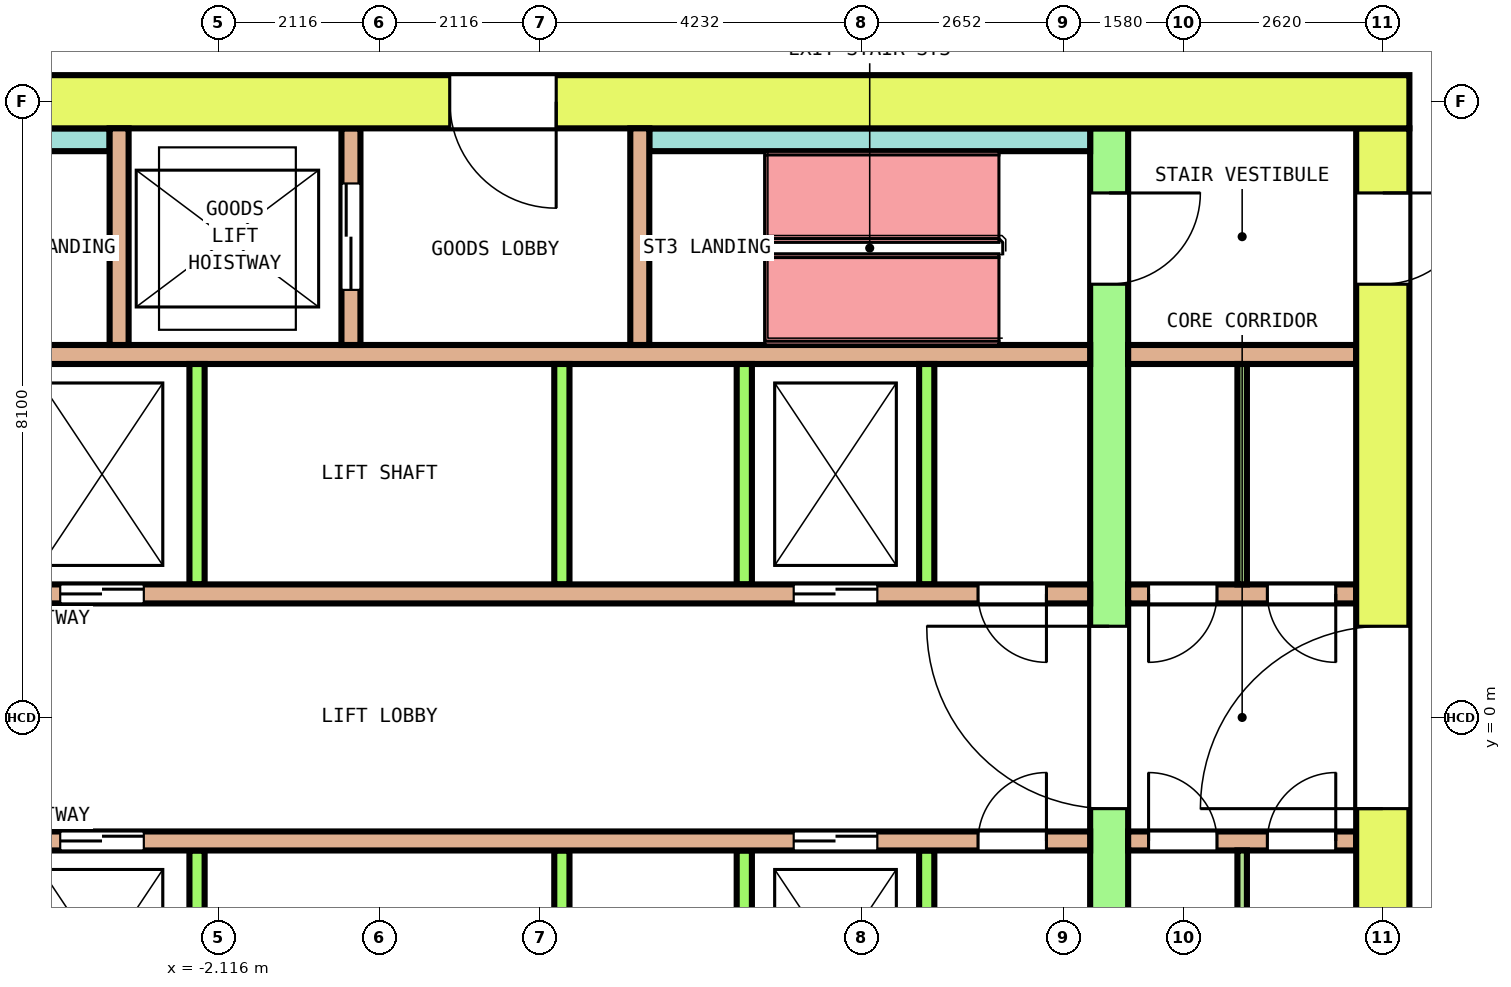
"""IFC4 building model, lengths in metres.
Left out: names, types, materials, properties, quantities, classifications, styles, units other than length and angle.
Written with IfcOpenShell. Run it as: python <this file> out.ifc"""

import sys

from ifc_helpers import new_model, si_unit, direction, frame, frame_2d, origin, place, context, subcontext, project, spatial, rectangle, extrude, element, fill, save


model = new_model("IFC4")
c1 = context("Model", 3, precision=1e-05, world=origin(), true_north=direction((0.0, 1.0)))
c2 = subcontext(c1, "Body", "Model", "MODEL_VIEW")
j1 = project(units=[si_unit("LENGTHUNIT", "METRE"), si_unit("PLANEANGLEUNIT", "RADIAN")], contexts=[c1])
p1 = place(None, origin())
s1 = spatial("IfcSite", under=j1, at=p1, CompositionType="ELEMENT")
p2 = place(p1, origin())
s2 = spatial("IfcBuilding", under=s1, at=p2, CompositionType="ELEMENT")
p3 = place(p2, frame((0.0, 0.0, 198.0)))
s3 = spatial("IfcBuildingStorey", under=s2, at=p3, CompositionType="ELEMENT", Elevation=198.0)
p4 = place(p3, frame((-13.55, 8.1, 0.0), z_axis=(0.0, 0.0, 1.0), x_axis=(1.0, 0.0, 0.0)))
e1 = element("IfcWall", 1, at=p4, inside=s3, PredefinedType="SHEAR", context=c2, shape_type="SweptSolid", body=[
    extrude(rectangle(XDim=27.1, YDim=0.7, at=frame_2d((13.55, 0.0))), origin(), (0.0, 0.0, 1.0), 4.1),
])
p5 = place(p4, frame((14.475, 0.0, 0.0)))
e2 = element("IfcOpeningElement", 2, at=p5, cuts=e1, PredefinedType="OPENING", context=c2, shape_type="SweptSolid", body=[
    extrude(rectangle(XDim=1.4, YDim=2.1, at=frame_2d((0.7, 1.05))), frame((0.0, 0.36, 0.0), z_axis=(0.0, -1.0, 0.0), x_axis=(1.0, 0.0, 0.0)), (0.0, 0.0, 1.0), 0.72),
])
p6 = place(p3, frame((13.2, -7.75, 0.0), z_axis=(0.0, 0.0, 1.0), x_axis=(0.0, 1.0, 0.0)))
e3 = element("IfcWall", 3, at=p6, inside=s3, PredefinedType="SHEAR", context=c2, shape_type="SweptSolid", body=[
    extrude(rectangle(XDim=15.5, YDim=0.7, at=frame_2d((7.75, 0.0))), origin(), (0.0, 0.0, 1.0), 4.1),
])
p7 = place(p6, frame((6.55, 0.0, 0.0)))
e4 = element("IfcOpeningElement", 4, at=p7, cuts=e3, PredefinedType="OPENING", context=c2, shape_type="SweptSolid", body=[
    extrude(rectangle(XDim=2.4, YDim=2.1, at=frame_2d((1.2, 1.05))), frame((0.0, 0.36, 0.0), z_axis=(0.0, -1.0, 0.0), x_axis=(1.0, 0.0, 0.0)), (0.0, 0.0, 1.0), 0.72),
])
p8 = place(p6, frame((13.45, 0.0, 0.0)))
e5 = element("IfcOpeningElement", 5, at=p8, cuts=e3, PredefinedType="OPENING", context=c2, shape_type="SweptSolid", body=[
    extrude(rectangle(XDim=1.2, YDim=2.1, at=frame_2d((0.6, 1.05))), frame((0.0, 0.36, 0.0), z_axis=(0.0, -1.0, 0.0), x_axis=(1.0, 0.0, 0.0)), (0.0, 0.0, 1.0), 0.72),
])
p9 = place(p6, frame((0.95, 0.0, 0.0)))
e6 = element("IfcOpeningElement", 6, at=p9, cuts=e3, PredefinedType="OPENING", context=c2, shape_type="SweptSolid", body=[
    extrude(rectangle(XDim=1.0, YDim=2.1, at=frame_2d((0.5, 1.05))), frame((0.0, 0.36, 0.0), z_axis=(0.0, -1.0, 0.0), x_axis=(1.0, 0.0, 0.0)), (0.0, 0.0, 1.0), 0.72),
])
p10 = place(p3, frame((9.6, -7.75, 0.0), z_axis=(0.0, 0.0, 1.0), x_axis=(0.0, 1.0, 0.0)))
e7 = element("IfcWall", 7, at=p10, inside=s3, PredefinedType="SHEAR", context=c2, shape_type="SweptSolid", body=[
    extrude(rectangle(XDim=15.5, YDim=0.5, at=frame_2d((7.75, 0.0))), origin(), (0.0, 0.0, 1.0), 4.1),
])
p11 = place(p10, frame((6.55, 0.0, 0.0)))
e8 = element("IfcOpeningElement", 8, at=p11, cuts=e7, PredefinedType="OPENING", context=c2, shape_type="SweptSolid", body=[
    extrude(rectangle(XDim=2.4, YDim=2.1, at=frame_2d((1.2, 1.05))), frame((0.0, 0.26, 0.0), z_axis=(0.0, -1.0, 0.0), x_axis=(1.0, 0.0, 0.0)), (0.0, 0.0, 1.0), 0.52),
])
p12 = place(p10, frame((13.45, 0.0, 0.0)))
e9 = element("IfcOpeningElement", 9, at=p12, cuts=e7, PredefinedType="OPENING", context=c2, shape_type="SweptSolid", body=[
    extrude(rectangle(XDim=1.2, YDim=2.1, at=frame_2d((0.6, 1.05))), frame((0.0, 0.26, 0.0), z_axis=(0.0, -1.0, 0.0), x_axis=(1.0, 0.0, 0.0)), (0.0, 0.0, 1.0), 0.52),
])
p13 = place(p10, frame((0.95, 0.0, 0.0)))
e10 = element("IfcOpeningElement", 10, at=p13, cuts=e7, PredefinedType="OPENING", context=c2, shape_type="SweptSolid", body=[
    extrude(rectangle(XDim=1.0, YDim=2.1, at=frame_2d((0.5, 1.05))), frame((0.0, 0.26, 0.0), z_axis=(0.0, -1.0, 0.0), x_axis=(1.0, 0.0, 0.0)), (0.0, 0.0, 1.0), 0.52),
])
p14 = place(p3, frame((-9.35, 1.625, 0.0), z_axis=(0.0, 0.0, 1.0), x_axis=(1.0, 0.0, 0.0)))
e11 = element("IfcWall", 11, at=p14, inside=s3, PredefinedType="SOLIDWALL", context=c2, shape_type="SweptSolid", body=[
    extrude(rectangle(XDim=18.7, YDim=0.25, at=frame_2d((9.35, 0.0))), origin(), (0.0, 0.0, 1.0), 4.1),
])
p15 = place(p14, frame((2.85, 0.0, 0.0)))
e12 = element("IfcOpeningElement", 12, at=p15, cuts=e11, PredefinedType="OPENING", context=c2, shape_type="SweptSolid", body=[
    extrude(rectangle(XDim=1.1, YDim=2.1, at=frame_2d((0.55, 1.05))), frame((0.0, 0.135, 0.0), z_axis=(0.0, -1.0, 0.0), x_axis=(1.0, 0.0, 0.0)), (0.0, 0.0, 1.0), 0.27),
])
p16 = place(p14, frame((5.15, 0.0, 0.0)))
e13 = element("IfcOpeningElement", 13, at=p16, cuts=e11, PredefinedType="OPENING", context=c2, shape_type="SweptSolid", body=[
    extrude(rectangle(XDim=1.1, YDim=2.1, at=frame_2d((0.55, 1.05))), frame((0.0, 0.135, 0.0), z_axis=(0.0, -1.0, 0.0), x_axis=(1.0, 0.0, 0.0)), (0.0, 0.0, 1.0), 0.27),
])
p17 = place(p14, frame((14.8, 0.0, 0.0)))
e14 = element("IfcOpeningElement", 14, at=p17, cuts=e11, PredefinedType="OPENING", context=c2, shape_type="SweptSolid", body=[
    extrude(rectangle(XDim=1.1, YDim=2.1, at=frame_2d((0.55, 1.05))), frame((0.0, 0.135, 0.0), z_axis=(0.0, -1.0, 0.0), x_axis=(1.0, 0.0, 0.0)), (0.0, 0.0, 1.0), 0.27),
])
p18 = place(p14, frame((0.575, 0.0, 0.0)))
e15 = element("IfcOpeningElement", 15, at=p18, cuts=e11, PredefinedType="OPENING", context=c2, shape_type="SweptSolid", body=[
    extrude(rectangle(XDim=0.9, YDim=2.1, at=frame_2d((0.45, 1.05))), frame((0.0, 0.135, 0.0), z_axis=(0.0, -1.0, 0.0), x_axis=(1.0, 0.0, 0.0)), (0.0, 0.0, 1.0), 0.27),
])
p19 = place(p14, frame((17.225, 0.0, 0.0)))
e16 = element("IfcOpeningElement", 16, at=p19, cuts=e11, PredefinedType="OPENING", context=c2, shape_type="SweptSolid", body=[
    extrude(rectangle(XDim=0.9, YDim=2.1, at=frame_2d((0.45, 1.05))), frame((0.0, 0.135, 0.0), z_axis=(0.0, -1.0, 0.0), x_axis=(1.0, 0.0, 0.0)), (0.0, 0.0, 1.0), 0.27),
])
p20 = place(p3, frame((9.85, 1.625, 0.0), z_axis=(0.0, 0.0, 1.0), x_axis=(1.0, 0.0, 0.0)))
e17 = element("IfcWall", 17, at=p20, inside=s3, PredefinedType="SOLIDWALL", context=c2, shape_type="SweptSolid", body=[
    extrude(rectangle(XDim=3.0, YDim=0.25, at=frame_2d((1.5, 0.0))), origin(), (0.0, 0.0, 1.0), 4.1),
])
p21 = place(p20, frame((0.269, 0.0, 0.0)))
e18 = element("IfcOpeningElement", 18, at=p21, cuts=e17, PredefinedType="OPENING", context=c2, shape_type="SweptSolid", body=[
    extrude(rectangle(XDim=0.9, YDim=2.1, at=frame_2d((0.45, 1.05))), frame((0.0, 0.135, 0.0), z_axis=(0.0, -1.0, 0.0), x_axis=(1.0, 0.0, 0.0)), (0.0, 0.0, 1.0), 0.27),
])
p22 = place(p20, frame((1.831, 0.0, 0.0)))
e19 = element("IfcOpeningElement", 19, at=p22, cuts=e17, PredefinedType="OPENING", context=c2, shape_type="SweptSolid", body=[
    extrude(rectangle(XDim=0.9, YDim=2.1, at=frame_2d((0.45, 1.05))), frame((0.0, 0.135, 0.0), z_axis=(0.0, -1.0, 0.0), x_axis=(1.0, 0.0, 0.0)), (0.0, 0.0, 1.0), 0.27),
])
p23 = place(p3, frame((-9.35, 4.775, 0.0), z_axis=(0.0, 0.0, 1.0), x_axis=(1.0, 0.0, 0.0)))
e20 = element("IfcWall", 20, at=p23, inside=s3, PredefinedType="SOLIDWALL", context=c2, shape_type="SweptSolid", body=[
    extrude(rectangle(XDim=18.7, YDim=0.25, at=frame_2d((9.35, 0.0))), origin(), (0.0, 0.0, 1.0), 4.1),
])
p24 = place(p3, frame((9.85, 4.775, 0.0), z_axis=(0.0, 0.0, 1.0), x_axis=(1.0, 0.0, 0.0)))
e21 = element("IfcWall", 21, at=p24, inside=s3, PredefinedType="SOLIDWALL", context=c2, shape_type="SweptSolid", body=[
    extrude(rectangle(XDim=3.0, YDim=0.25, at=frame_2d((1.5, 0.0))), origin(), (0.0, 0.0, 1.0), 4.1),
])
for number, where, z_axis, x_axis in (
    (22, (-2.4, 1.75, 0.0), (0.0, 0.0, 1.0), (0.0, 1.0, 0.0)),
    (23, (2.4, 1.75, 0.0), (0.0, 0.0, 1.0), (0.0, 1.0, 0.0)),
    (24, (4.8, 1.75, 0.0), (0.0, 0.0, 1.0), (0.0, 1.0, 0.0)),
    (25, (7.2, 1.75, 0.0), (0.0, 0.0, 1.0), (0.0, 1.0, 0.0)),
):
    element("IfcWall", number, at=place(p3, frame(where, z_axis=z_axis, x_axis=x_axis)), inside=s3, PredefinedType="SOLIDWALL", context=c2, shape_type="SweptSolid", body=[
        extrude(rectangle(XDim=2.9, YDim=0.2, at=frame_2d((1.45, 0.0))), origin(), (0.0, 0.0, 1.0), 4.1),
    ])
p25 = place(p3, frame((-9.35, -1.625, 0.0), z_axis=(0.0, 0.0, 1.0), x_axis=(1.0, 0.0, 0.0)))
e26 = element("IfcWall", 26, at=p25, inside=s3, PredefinedType="SOLIDWALL", context=c2, shape_type="SweptSolid", body=[
    extrude(rectangle(XDim=18.7, YDim=0.25, at=frame_2d((9.35, 0.0))), origin(), (0.0, 0.0, 1.0), 4.1),
])
p26 = place(p25, frame((2.85, 0.0, 0.0)))
e27 = element("IfcOpeningElement", 27, at=p26, cuts=e26, PredefinedType="OPENING", context=c2, shape_type="SweptSolid", body=[
    extrude(rectangle(XDim=1.1, YDim=2.1, at=frame_2d((0.55, 1.05))), frame((0.0, 0.135, 0.0), z_axis=(0.0, -1.0, 0.0), x_axis=(1.0, 0.0, 0.0)), (0.0, 0.0, 1.0), 0.27),
])
p27 = place(p25, frame((5.15, 0.0, 0.0)))
e28 = element("IfcOpeningElement", 28, at=p27, cuts=e26, PredefinedType="OPENING", context=c2, shape_type="SweptSolid", body=[
    extrude(rectangle(XDim=1.1, YDim=2.1, at=frame_2d((0.55, 1.05))), frame((0.0, 0.135, 0.0), z_axis=(0.0, -1.0, 0.0), x_axis=(1.0, 0.0, 0.0)), (0.0, 0.0, 1.0), 0.27),
])
p28 = place(p25, frame((14.8, 0.0, 0.0)))
e29 = element("IfcOpeningElement", 29, at=p28, cuts=e26, PredefinedType="OPENING", context=c2, shape_type="SweptSolid", body=[
    extrude(rectangle(XDim=1.1, YDim=2.1, at=frame_2d((0.55, 1.05))), frame((0.0, 0.135, 0.0), z_axis=(0.0, -1.0, 0.0), x_axis=(1.0, 0.0, 0.0)), (0.0, 0.0, 1.0), 0.27),
])
p29 = place(p25, frame((0.575, 0.0, 0.0)))
e30 = element("IfcOpeningElement", 30, at=p29, cuts=e26, PredefinedType="OPENING", context=c2, shape_type="SweptSolid", body=[
    extrude(rectangle(XDim=0.9, YDim=2.1, at=frame_2d((0.45, 1.05))), frame((0.0, 0.135, 0.0), z_axis=(0.0, -1.0, 0.0), x_axis=(1.0, 0.0, 0.0)), (0.0, 0.0, 1.0), 0.27),
])
p30 = place(p25, frame((17.225, 0.0, 0.0)))
e31 = element("IfcOpeningElement", 31, at=p30, cuts=e26, PredefinedType="OPENING", context=c2, shape_type="SweptSolid", body=[
    extrude(rectangle(XDim=0.9, YDim=2.1, at=frame_2d((0.45, 1.05))), frame((0.0, 0.135, 0.0), z_axis=(0.0, -1.0, 0.0), x_axis=(1.0, 0.0, 0.0)), (0.0, 0.0, 1.0), 0.27),
])
p31 = place(p3, frame((9.85, -1.625, 0.0), z_axis=(0.0, 0.0, 1.0), x_axis=(1.0, 0.0, 0.0)))
e32 = element("IfcWall", 32, at=p31, inside=s3, PredefinedType="SOLIDWALL", context=c2, shape_type="SweptSolid", body=[
    extrude(rectangle(XDim=3.0, YDim=0.25, at=frame_2d((1.5, 0.0))), origin(), (0.0, 0.0, 1.0), 4.1),
])
p32 = place(p31, frame((0.269, 0.0, 0.0)))
e33 = element("IfcOpeningElement", 33, at=p32, cuts=e32, PredefinedType="OPENING", context=c2, shape_type="SweptSolid", body=[
    extrude(rectangle(XDim=0.9, YDim=2.1, at=frame_2d((0.45, 1.05))), frame((0.0, 0.135, 0.0), z_axis=(0.0, -1.0, 0.0), x_axis=(1.0, 0.0, 0.0)), (0.0, 0.0, 1.0), 0.27),
])
p33 = place(p31, frame((1.831, 0.0, 0.0)))
e34 = element("IfcOpeningElement", 34, at=p33, cuts=e32, PredefinedType="OPENING", context=c2, shape_type="SweptSolid", body=[
    extrude(rectangle(XDim=0.9, YDim=2.1, at=frame_2d((0.45, 1.05))), frame((0.0, 0.135, 0.0), z_axis=(0.0, -1.0, 0.0), x_axis=(1.0, 0.0, 0.0)), (0.0, 0.0, 1.0), 0.27),
])
for number, where, z_axis, x_axis in (
    (35, (-2.4, -4.65, 0.0), (0.0, 0.0, 1.0), (0.0, 1.0, 0.0)),
    (36, (2.4, -4.65, 0.0), (0.0, 0.0, 1.0), (0.0, 1.0, 0.0)),
    (37, (4.8, -4.65, 0.0), (0.0, 0.0, 1.0), (0.0, 1.0, 0.0)),
    (38, (7.2, -4.65, 0.0), (0.0, 0.0, 1.0), (0.0, 1.0, 0.0)),
):
    element("IfcWall", number, at=place(p3, frame(where, z_axis=z_axis, x_axis=x_axis)), inside=s3, PredefinedType="SOLIDWALL", context=c2, shape_type="SweptSolid", body=[
        extrude(rectangle(XDim=2.9, YDim=0.2, at=frame_2d((1.45, 0.0))), origin(), (0.0, 0.0, 1.0), 4.1),
    ])
for number, where, z_axis, x_axis in (
    (39, (-9.35, 7.6, 0.0), (0.0, 0.0, 1.0), (1.0, 0.0, 0.0)),
    (40, (3.55, 7.6, 0.0), (0.0, 0.0, 1.0), (1.0, 0.0, 0.0)),
):
    element("IfcWall", number, at=place(p3, frame(where, z_axis=z_axis, x_axis=x_axis)), inside=s3, PredefinedType="SOLIDWALL", context=c2, shape_type="SweptSolid", body=[
        extrude(rectangle(XDim=5.8, YDim=0.3, at=frame_2d((2.9, 0.0))), origin(), (0.0, 0.0, 1.0), 4.1),
    ])
p34 = place(p3, frame((-3.425, 4.9, 0.0), z_axis=(0.0, 0.0, 1.0), x_axis=(0.0, 1.0, 0.0)))
e41 = element("IfcWall", 41, at=p34, inside=s3, PredefinedType="SOLIDWALL", context=c2, shape_type="SweptSolid", body=[
    extrude(rectangle(XDim=2.85, YDim=0.25, at=frame_2d((1.425, 0.0))), origin(), (0.0, 0.0, 1.0), 4.1),
])
p35 = place(p3, frame((-0.375, 4.9, 0.0), z_axis=(0.0, 0.0, 1.0), x_axis=(0.0, 1.0, 0.0)))
e42 = element("IfcWall", 42, at=p35, inside=s3, PredefinedType="SOLIDWALL", context=c2, shape_type="SweptSolid", body=[
    extrude(rectangle(XDim=2.85, YDim=0.25, at=frame_2d((1.425, 0.0))), origin(), (0.0, 0.0, 1.0), 4.1),
])
p36 = place(p35, frame((0.725, 0.0, 0.0)))
e43 = element("IfcOpeningElement", 43, at=p36, cuts=e42, PredefinedType="OPENING", context=c2, shape_type="SweptSolid", body=[
    extrude(rectangle(XDim=1.4, YDim=2.1, at=frame_2d((0.7, 1.05))), frame((0.0, 0.135, 0.0), z_axis=(0.0, -1.0, 0.0), x_axis=(1.0, 0.0, 0.0)), (0.0, 0.0, 1.0), 0.27),
])
p37 = place(p3, frame((3.425, 4.9, 0.0), z_axis=(0.0, 0.0, 1.0), x_axis=(0.0, 1.0, 0.0)))
e44 = element("IfcWall", 44, at=p37, inside=s3, PredefinedType="SOLIDWALL", context=c2, shape_type="SweptSolid", body=[
    extrude(rectangle(XDim=2.85, YDim=0.25, at=frame_2d((1.425, 0.0))), origin(), (0.0, 0.0, 1.0), 4.1),
])
for number, where, z_axis, x_axis in (
    (45, (11.35, 1.75, 0.0), (0.0, 0.0, 1.0), (0.0, 1.0, 0.0)),
    (46, (11.35, -4.65, 0.0), (0.0, 0.0, 1.0), (0.0, 1.0, 0.0)),
):
    element("IfcWall", number, at=place(p3, frame(where, z_axis=z_axis, x_axis=x_axis)), inside=s3, PredefinedType="PARTITIONING", context=c2, shape_type="SweptSolid", body=[
        extrude(rectangle(XDim=2.9, YDim=0.125, at=frame_2d((1.45, 0.0))), origin(), (0.0, 0.0, 1.0), 4.1),
    ])
p38 = place(p16, origin())
e47 = element("IfcDoor", 47, at=p38, inside=s3, OperationType="DOUBLE_DOOR_SLIDING", PredefinedType="DOOR", context=c2, shape_type="SweptSolid", body=[
    extrude(rectangle(XDim=1.1, YDim=2.1, at=frame_2d((0.55, 1.05))), frame((0.0, 0.075, 0.0), z_axis=(0.0, -1.0, 0.0), x_axis=(1.0, 0.0, 0.0)), (0.0, 0.0, 1.0), 0.15),
])
fill(e13, e47)
p39 = place(p17, origin())
e48 = element("IfcDoor", 48, at=p39, inside=s3, OperationType="DOUBLE_DOOR_SLIDING", PredefinedType="DOOR", context=c2, shape_type="SweptSolid", body=[
    extrude(rectangle(XDim=1.1, YDim=2.1, at=frame_2d((0.55, 1.05))), frame((0.0, 0.075, 0.0), z_axis=(0.0, -1.0, 0.0), x_axis=(1.0, 0.0, 0.0)), (0.0, 0.0, 1.0), 0.15),
])
fill(e14, e48)
p40 = place(p27, origin())
e49 = element("IfcDoor", 49, at=p40, inside=s3, OperationType="DOUBLE_DOOR_SLIDING", PredefinedType="DOOR", context=c2, shape_type="SweptSolid", body=[
    extrude(rectangle(XDim=1.1, YDim=2.1, at=frame_2d((0.55, 1.05))), frame((0.0, 0.075, 0.0), z_axis=(0.0, -1.0, 0.0), x_axis=(1.0, 0.0, 0.0)), (0.0, 0.0, 1.0), 0.15),
])
fill(e28, e49)
p41 = place(p28, origin())
e50 = element("IfcDoor", 50, at=p41, inside=s3, OperationType="DOUBLE_DOOR_SLIDING", PredefinedType="DOOR", context=c2, shape_type="SweptSolid", body=[
    extrude(rectangle(XDim=1.1, YDim=2.1, at=frame_2d((0.55, 1.05))), frame((0.0, 0.075, 0.0), z_axis=(0.0, -1.0, 0.0), x_axis=(1.0, 0.0, 0.0)), (0.0, 0.0, 1.0), 0.15),
])
fill(e29, e50)
p42 = place(p36, origin())
e51 = element("IfcDoor", 51, at=p42, inside=s3, OperationType="DOUBLE_DOOR_SLIDING", PredefinedType="DOOR", context=c2, shape_type="SweptSolid", body=[
    extrude(rectangle(XDim=1.4, YDim=2.1, at=frame_2d((0.7, 1.05))), frame((0.0, 0.075, 0.0), z_axis=(0.0, -1.0, 0.0), x_axis=(1.0, 0.0, 0.0)), (0.0, 0.0, 1.0), 0.15),
])
fill(e43, e51)
p43 = place(p11, origin())
e52 = element("IfcDoor", 52, at=p43, inside=s3, OperationType="DOUBLE_DOOR_SINGLE_SWING", PredefinedType="DOOR", context=c2, shape_type="SweptSolid", body=[
    extrude(rectangle(XDim=2.4, YDim=2.1, at=frame_2d((1.2, 1.05))), frame((0.0, 0.2, 0.0), z_axis=(0.0, -1.0, 0.0), x_axis=(1.0, 0.0, 0.0)), (0.0, 0.0, 1.0), 0.4),
])
fill(e8, e52)
p44 = place(p7, origin())
e53 = element("IfcDoor", 53, at=p44, inside=s3, OperationType="DOUBLE_DOOR_SINGLE_SWING", PredefinedType="DOOR", context=c2, shape_type="SweptSolid", body=[
    extrude(rectangle(XDim=2.4, YDim=2.1, at=frame_2d((1.2, 1.05))), frame((0.0, 0.3, 0.0), z_axis=(0.0, -1.0, 0.0), x_axis=(1.0, 0.0, 0.0)), (0.0, 0.0, 1.0), 0.6),
])
fill(e4, e53)
p45 = place(p12, origin())
e54 = element("IfcDoor", 54, at=p45, inside=s3, OperationType="SINGLE_SWING_RIGHT", PredefinedType="DOOR", context=c2, shape_type="SweptSolid", body=[
    extrude(rectangle(XDim=1.2, YDim=2.1, at=frame_2d((0.6, 1.05))), frame((0.0, 0.2, 0.0), z_axis=(0.0, -1.0, 0.0), x_axis=(1.0, 0.0, 0.0)), (0.0, 0.0, 1.0), 0.4),
])
fill(e9, e54)
p46 = place(p8, origin())
e55 = element("IfcDoor", 55, at=p46, inside=s3, OperationType="SINGLE_SWING_LEFT", PredefinedType="DOOR", context=c2, shape_type="SweptSolid", body=[
    extrude(rectangle(XDim=1.2, YDim=2.1, at=frame_2d((0.6, 1.05))), frame((0.0, 0.3, 0.0), z_axis=(0.0, -1.0, 0.0), x_axis=(1.0, 0.0, 0.0)), (0.0, 0.0, 1.0), 0.6),
])
fill(e5, e55)
p47 = place(p5, origin())
e56 = element("IfcDoor", 56, at=p47, inside=s3, OperationType="DOUBLE_DOOR_SINGLE_SWING", PredefinedType="DOOR", context=c2, shape_type="SweptSolid", body=[
    extrude(rectangle(XDim=1.4, YDim=2.1, at=frame_2d((0.7, 1.05))), frame((0.0, 0.3, 0.0), z_axis=(0.0, -1.0, 0.0), x_axis=(1.0, 0.0, 0.0)), (0.0, 0.0, 1.0), 0.6),
])
fill(e2, e56)
p48 = place(p19, origin())
e57 = element("IfcDoor", 57, at=p48, inside=s3, OperationType="SINGLE_SWING_LEFT", PredefinedType="DOOR", context=c2, shape_type="SweptSolid", body=[
    extrude(rectangle(XDim=0.9, YDim=2.1, at=frame_2d((0.45, 1.05))), frame((0.0, 0.075, 0.0), z_axis=(0.0, -1.0, 0.0), x_axis=(1.0, 0.0, 0.0)), (0.0, 0.0, 1.0), 0.15),
])
fill(e16, e57)
p49 = place(p21, origin())
e58 = element("IfcDoor", 58, at=p49, inside=s3, OperationType="SINGLE_SWING_RIGHT", PredefinedType="DOOR", context=c2, shape_type="SweptSolid", body=[
    extrude(rectangle(XDim=0.9, YDim=2.1, at=frame_2d((0.45, 1.05))), frame((0.0, 0.075, 0.0), z_axis=(0.0, -1.0, 0.0), x_axis=(1.0, 0.0, 0.0)), (0.0, 0.0, 1.0), 0.15),
])
fill(e18, e58)
p50 = place(p22, origin())
e59 = element("IfcDoor", 59, at=p50, inside=s3, OperationType="SINGLE_SWING_LEFT", PredefinedType="DOOR", context=c2, shape_type="SweptSolid", body=[
    extrude(rectangle(XDim=0.9, YDim=2.1, at=frame_2d((0.45, 1.05))), frame((0.0, 0.075, 0.0), z_axis=(0.0, -1.0, 0.0), x_axis=(1.0, 0.0, 0.0)), (0.0, 0.0, 1.0), 0.15),
])
fill(e19, e59)
p51 = place(p30, origin())
e60 = element("IfcDoor", 60, at=p51, inside=s3, OperationType="SINGLE_SWING_LEFT", PredefinedType="DOOR", context=c2, shape_type="SweptSolid", body=[
    extrude(rectangle(XDim=0.9, YDim=2.1, at=frame_2d((0.45, 1.05))), frame((0.0, 0.075, 0.0), z_axis=(0.0, -1.0, 0.0), x_axis=(1.0, 0.0, 0.0)), (0.0, 0.0, 1.0), 0.15),
])
fill(e31, e60)
p52 = place(p32, origin())
e61 = element("IfcDoor", 61, at=p52, inside=s3, OperationType="SINGLE_SWING_RIGHT", PredefinedType="DOOR", context=c2, shape_type="SweptSolid", body=[
    extrude(rectangle(XDim=0.9, YDim=2.1, at=frame_2d((0.45, 1.05))), frame((0.0, 0.075, 0.0), z_axis=(0.0, -1.0, 0.0), x_axis=(1.0, 0.0, 0.0)), (0.0, 0.0, 1.0), 0.15),
])
fill(e33, e61)
p53 = place(p33, origin())
e62 = element("IfcDoor", 62, at=p53, inside=s3, OperationType="SINGLE_SWING_LEFT", PredefinedType="DOOR", context=c2, shape_type="SweptSolid", body=[
    extrude(rectangle(XDim=0.9, YDim=2.1, at=frame_2d((0.45, 1.05))), frame((0.0, 0.075, 0.0), z_axis=(0.0, -1.0, 0.0), x_axis=(1.0, 0.0, 0.0)), (0.0, 0.0, 1.0), 0.15),
])
fill(e34, e62)
save(model, sys.argv[1])
